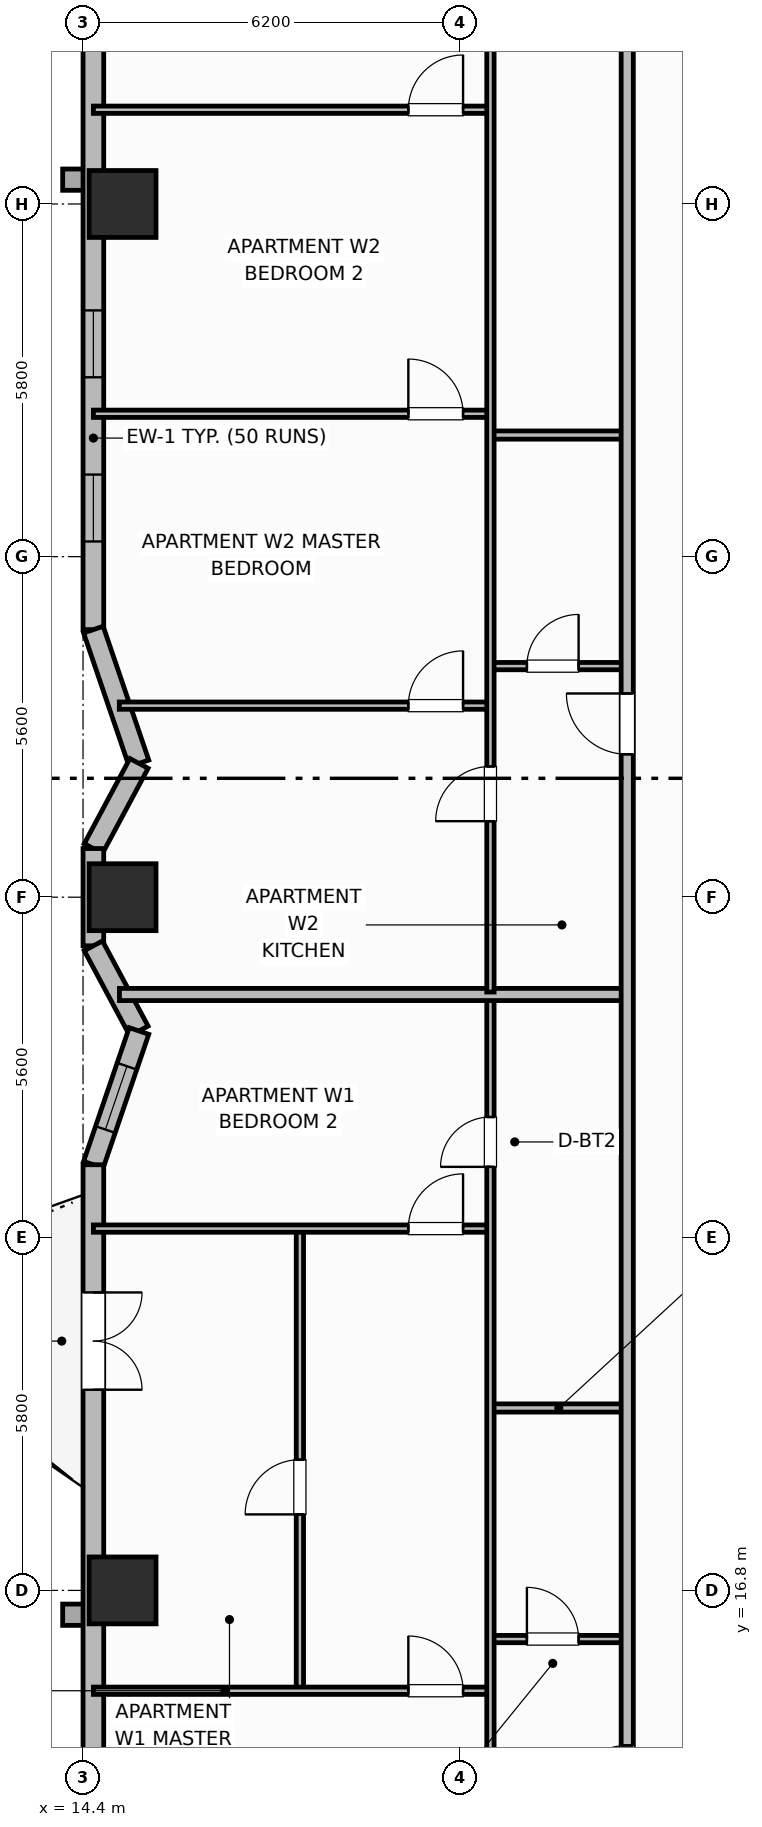
"""IFC4 building model, lengths in metres.
Left out: names, types, materials, properties, quantities, classifications, styles, units other than length and angle.
Written with IfcOpenShell. Run it as: python <this file> out.ifc"""

import sys

from ifc_helpers import new_model, si_unit, direction, frame, frame_2d, origin, origin_2d, place, context, subcontext, project, spatial, rectangle, extrude, element, fill, save


model = new_model("IFC4")
c1 = context("Model", 3, precision=1e-05, world=origin(), true_north=direction((0.0, 1.0)))
c2 = subcontext(c1, "Body", "Model", "MODEL_VIEW")
j1 = project(units=[si_unit("LENGTHUNIT", "METRE"), si_unit("PLANEANGLEUNIT", "RADIAN")], contexts=[c1])
p1 = place(None, origin())
s1 = spatial("IfcSite", under=j1, at=p1, CompositionType="ELEMENT")
p2 = place(p1, origin())
s2 = spatial("IfcBuilding", under=s1, at=p2, CompositionType="ELEMENT")
p3 = place(p2, frame((0.0, 0.0, 117.9)))
s3 = spatial("IfcBuildingStorey", under=s2, at=p3, CompositionType="ELEMENT", Elevation=117.9)
for number, where, z_axis, x_axis in (
    (1, (15.05, 16.8, 0.0), (0.0, 0.0, 1.0), (1.0, 0.0, 0.0)),
    (2, (15.05, 28.2, 0.0), (0.0, 0.0, 1.0), (1.0, 0.0, 0.0)),
    (3, (15.05, 39.6, 0.0), (0.0, 0.0, 1.0), (1.0, 0.0, 0.0)),
):
    element("IfcColumn", number, at=place(p3, frame(where, z_axis=z_axis, x_axis=x_axis)), inside=s3, PredefinedType="COLUMN", context=c2, shape_type="SweptSolid", body=[
        extrude(rectangle(XDim=1.1, YDim=1.1, at=origin_2d()), origin(), (0.0, 0.0, 1.0), 3.7),
    ])
p4 = place(p3, frame((14.57, 47.4, 0.0), z_axis=(0.0, 0.0, 1.0), x_axis=(0.0, -1.0, 0.0)))
e4 = element("IfcWall", 4, at=p4, inside=s3, PredefinedType="SOLIDWALL", context=c2, shape_type="SweptSolid", body=[
    extrude(rectangle(XDim=14.8, YDim=0.34, at=frame_2d((7.4, 0.0))), origin(), (0.0, 0.0, 1.0), 2.7),
])
p5 = place(p4, frame((4.15, 0.0, 0.93)))
e5 = element("IfcOpeningElement", 5, at=p5, cuts=e4, PredefinedType="OPENING", context=c2, shape_type="SweptSolid", body=[
    extrude(rectangle(XDim=1.1, YDim=1.65, at=frame_2d((0.55, 0.825))), frame((0.0, 0.18, 0.0), z_axis=(0.0, -1.0, 0.0), x_axis=(1.0, 0.0, 0.0)), (0.0, 0.0, 1.0), 0.36),
])
p6 = place(p4, frame((9.55, 0.0, 0.93)))
e6 = element("IfcOpeningElement", 6, at=p6, cuts=e4, PredefinedType="OPENING", context=c2, shape_type="SweptSolid", body=[
    extrude(rectangle(XDim=1.1, YDim=1.65, at=frame_2d((0.55, 0.825))), frame((0.0, 0.18, 0.0), z_axis=(0.0, -1.0, 0.0), x_axis=(1.0, 0.0, 0.0)), (0.0, 0.0, 1.0), 0.36),
])
p7 = place(p4, frame((12.25, 0.0, 0.93)))
e7 = element("IfcOpeningElement", 7, at=p7, cuts=e4, PredefinedType="OPENING", context=c2, shape_type="SweptSolid", body=[
    extrude(rectangle(XDim=1.1, YDim=1.65, at=frame_2d((0.55, 0.825))), frame((0.0, 0.18, 0.0), z_axis=(0.0, -1.0, 0.0), x_axis=(1.0, 0.0, 0.0)), (0.0, 0.0, 1.0), 0.36),
])
p8 = place(p3, frame((14.57, 32.6, 0.0), z_axis=(0.0, 0.0, 1.0), x_axis=(0.32264826586, -0.946518936175, 0.0)))
e8 = element("IfcWall", 8, at=p8, inside=s3, PredefinedType="SOLIDWALL", context=c2, shape_type="SweptSolid", body=[
    extrude(rectangle(XDim=2.324, YDim=0.34, at=frame_2d((1.162, 0.0))), origin(), (0.0, 0.0, 1.0), 2.7),
])
p9 = place(p3, frame((15.32, 30.4, 0.0), z_axis=(0.0, 0.0, 1.0), x_axis=(-0.472247007964, -0.881466257703, 0.0)))
e9 = element("IfcWall", 9, at=p9, inside=s3, PredefinedType="SOLIDWALL", context=c2, shape_type="SweptSolid", body=[
    extrude(rectangle(XDim=1.588, YDim=0.34, at=frame_2d((0.794, 0.0))), origin(), (0.0, 0.0, 1.0), 2.7),
])
p10 = place(p3, frame((14.57, 29.0, 0.0), z_axis=(0.0, 0.0, 1.0), x_axis=(0.0, -1.0, 0.0)))
e10 = element("IfcWall", 10, at=p10, inside=s3, PredefinedType="SOLIDWALL", context=c2, shape_type="SweptSolid", body=[
    extrude(rectangle(XDim=1.6, YDim=0.34, at=frame_2d((0.8, 0.0))), origin(), (0.0, 0.0, 1.0), 2.7),
])
p11 = place(p3, frame((14.57, 27.4, 0.0), z_axis=(0.0, 0.0, 1.0), x_axis=(0.472247007964, -0.881466257703, 0.0)))
e11 = element("IfcWall", 11, at=p11, inside=s3, PredefinedType="SOLIDWALL", context=c2, shape_type="SweptSolid", body=[
    extrude(rectangle(XDim=1.588, YDim=0.34, at=frame_2d((0.794, 0.0))), origin(), (0.0, 0.0, 1.0), 2.7),
])
p12 = place(p3, frame((15.32, 26.0, 0.0), z_axis=(0.0, 0.0, 1.0), x_axis=(-0.322680343871, -0.946508000853, 0.0)))
e12 = element("IfcWall", 12, at=p12, inside=s3, PredefinedType="SOLIDWALL", context=c2, shape_type="SweptSolid", body=[
    extrude(rectangle(XDim=2.324, YDim=0.34, at=frame_2d((1.162, 0.0))), origin(), (0.0, 0.0, 1.0), 2.7),
])
p13 = place(p12, frame((0.612, 0.0, 0.89)))
e13 = element("IfcOpeningElement", 13, at=p13, cuts=e12, PredefinedType="OPENING", context=c2, shape_type="SweptSolid", body=[
    extrude(rectangle(XDim=1.1, YDim=1.65, at=frame_2d((0.55, 0.825))), frame((0.0, 0.18, 0.0), z_axis=(0.0, -1.0, 0.0), x_axis=(1.0, 0.0, 0.0)), (0.0, 0.0, 1.0), 0.36),
])
p14 = place(p3, frame((14.57, 23.8, 0.0), z_axis=(0.0, 0.0, 1.0), x_axis=(0.0, -1.0, 0.0)))
e14 = element("IfcWall", 14, at=p14, inside=s3, PredefinedType="SOLIDWALL", context=c2, shape_type="SweptSolid", body=[
    extrude(rectangle(XDim=14.8, YDim=0.34, at=frame_2d((7.4, 0.0))), origin(), (0.0, 0.0, 1.0), 2.7),
])
p15 = place(p14, frame((2.1, 0.0, 0.0)))
e15 = element("IfcOpeningElement", 15, at=p15, cuts=e14, PredefinedType="OPENING", context=c2, shape_type="SweptSolid", body=[
    extrude(rectangle(XDim=1.6, YDim=2.1, at=frame_2d((0.8, 1.05))), frame((0.0, 0.18, 0.0), z_axis=(0.0, -1.0, 0.0), x_axis=(1.0, 0.0, 0.0)), (0.0, 0.0, 1.0), 0.36),
])
p16 = place(p14, frame((9.8, 0.0, 0.68)))
e16 = element("IfcOpeningElement", 16, at=p16, cuts=e14, PredefinedType="OPENING", context=c2, shape_type="SweptSolid", body=[
    extrude(rectangle(XDim=2.1, YDim=1.9, at=frame_2d((1.05, 0.95))), frame((0.0, 0.18, 0.0), z_axis=(0.0, -1.0, 0.0), x_axis=(1.0, 0.0, 0.0)), (0.0, 0.0, 1.0), 0.36),
])
p17 = place(p3, frame((21.1, 16.0, 0.0), z_axis=(0.0, 0.0, 1.0), x_axis=(1.0, 0.0, 0.0)))
e17 = element("IfcWall", 17, at=p17, inside=s3, PredefinedType="PARTITIONING", context=c2, shape_type="SweptSolid", body=[
    extrude(rectangle(XDim=2.25, YDim=0.12, at=frame_2d((1.125, 0.0))), origin(), (0.0, 0.0, 1.0), 2.53),
])
p18 = place(p17, frame((0.6, 0.0, 0.0)))
e18 = element("IfcOpeningElement", 18, at=p18, cuts=e17, PredefinedType="OPENING", context=c2, shape_type="SweptSolid", body=[
    extrude(rectangle(XDim=0.85, YDim=2.1, at=frame_2d((0.425, 1.05))), frame((0.0, 0.07, 0.0), z_axis=(0.0, -1.0, 0.0), x_axis=(1.0, 0.0, 0.0)), (0.0, 0.0, 1.0), 0.14),
])
p19 = place(p3, frame((21.1, 19.8, 0.0), z_axis=(0.0, 0.0, 1.0), x_axis=(1.0, 0.0, 0.0)))
e19 = element("IfcWall", 19, at=p19, inside=s3, PredefinedType="PARTITIONING", context=c2, shape_type="SweptSolid", body=[
    extrude(rectangle(XDim=2.25, YDim=0.135, at=frame_2d((1.125, 0.0))), origin(), (0.0, 0.0, 1.0), 2.53),
])
p20 = place(p3, frame((17.966, 15.19, 0.0), z_axis=(0.0, 0.0, 1.0), x_axis=(0.0, 1.0, 0.0)))
e20 = element("IfcWall", 20, at=p20, inside=s3, PredefinedType="PARTITIONING", context=c2, shape_type="SweptSolid", body=[
    extrude(rectangle(XDim=7.52, YDim=0.12, at=frame_2d((3.76, 0.0))), origin(), (0.0, 0.0, 1.0), 2.53),
])
p21 = place(p20, frame((2.86, 0.0, 0.0)))
e21 = element("IfcOpeningElement", 21, at=p21, cuts=e20, PredefinedType="OPENING", context=c2, shape_type="SweptSolid", body=[
    extrude(rectangle(XDim=0.9, YDim=2.1, at=frame_2d((0.45, 1.05))), frame((0.0, 0.07, 0.0), z_axis=(0.0, -1.0, 0.0), x_axis=(1.0, 0.0, 0.0)), (0.0, 0.0, 1.0), 0.14),
])
p22 = place(p3, frame((14.57, 15.15, 0.0), z_axis=(0.0, 0.0, 1.0), x_axis=(1.0, 0.0, 0.0)))
e22 = element("IfcWall", 22, at=p22, inside=s3, PredefinedType="PARTITIONING", context=c2, shape_type="SweptSolid", body=[
    extrude(rectangle(XDim=6.53, YDim=0.12, at=frame_2d((3.265, 0.0))), origin(), (0.0, 0.0, 1.0), 2.53),
])
p23 = place(p22, frame((5.18, 0.0, 0.0)))
e23 = element("IfcOpeningElement", 23, at=p23, cuts=e22, PredefinedType="OPENING", context=c2, shape_type="SweptSolid", body=[
    extrude(rectangle(XDim=0.9, YDim=2.1, at=frame_2d((0.45, 1.05))), frame((0.0, 0.07, 0.0), z_axis=(0.0, -1.0, 0.0), x_axis=(1.0, 0.0, 0.0)), (0.0, 0.0, 1.0), 0.14),
])
p24 = place(p3, frame((14.57, 22.75, 0.0), z_axis=(0.0, 0.0, 1.0), x_axis=(1.0, 0.0, 0.0)))
e24 = element("IfcWall", 24, at=p24, inside=s3, PredefinedType="PARTITIONING", context=c2, shape_type="SweptSolid", body=[
    extrude(rectangle(XDim=6.53, YDim=0.12, at=frame_2d((3.265, 0.0))), origin(), (0.0, 0.0, 1.0), 2.53),
])
p25 = place(p24, frame((5.18, 0.0, 0.0)))
e25 = element("IfcOpeningElement", 25, at=p25, cuts=e24, PredefinedType="OPENING", context=c2, shape_type="SweptSolid", body=[
    extrude(rectangle(XDim=0.9, YDim=2.1, at=frame_2d((0.45, 1.05))), frame((0.0, 0.07, 0.0), z_axis=(0.0, -1.0, 0.0), x_axis=(1.0, 0.0, 0.0)), (0.0, 0.0, 1.0), 0.14),
])
p26 = place(p3, frame((21.1, 10.64, 0.0), z_axis=(0.0, 0.0, 1.0), x_axis=(0.0, 1.0, 0.0)))
e26 = element("IfcWall", 26, at=p26, inside=s3, PredefinedType="PARTITIONING", context=c2, shape_type="SweptSolid", body=[
    extrude(rectangle(XDim=15.92, YDim=0.12, at=frame_2d((7.96, 0.0))), origin(), (0.0, 0.0, 1.0), 2.53),
])
p27 = place(p26, frame((0.41, 0.0, 0.0)))
e27 = element("IfcOpeningElement", 27, at=p27, cuts=e26, PredefinedType="OPENING", context=c2, shape_type="SweptSolid", body=[
    extrude(rectangle(XDim=0.9, YDim=2.1, at=frame_2d((0.45, 1.05))), frame((0.0, 0.07, 0.0), z_axis=(0.0, -1.0, 0.0), x_axis=(1.0, 0.0, 0.0)), (0.0, 0.0, 1.0), 0.14),
])
p28 = place(p26, frame((13.125, 0.0, 0.0)))
e28 = element("IfcOpeningElement", 28, at=p28, cuts=e26, PredefinedType="OPENING", context=c2, shape_type="SweptSolid", body=[
    extrude(rectangle(XDim=0.82, YDim=2.08, at=frame_2d((0.41, 1.04))), frame((0.0, 0.07, 0.0), z_axis=(0.0, -1.0, 0.0), x_axis=(1.0, 0.0, 0.0)), (0.0, 0.0, 1.0), 0.14),
])
p29 = place(p3, frame((14.999, 26.6, 0.0), z_axis=(0.0, 0.0, 1.0), x_axis=(1.0, 0.0, 0.0)))
e29 = element("IfcWall", 29, at=p29, inside=s3, PredefinedType="PARTITIONING", context=c2, shape_type="SweptSolid", body=[
    extrude(rectangle(XDim=8.352, YDim=0.2, at=frame_2d((4.176, 0.0))), origin(), (0.0, 0.0, 1.0), 2.53),
])
p30 = place(p3, frame((21.1, 32.0, 0.0), z_axis=(0.0, 0.0, 1.0), x_axis=(1.0, 0.0, 0.0)))
e30 = element("IfcWall", 30, at=p30, inside=s3, PredefinedType="PARTITIONING", context=c2, shape_type="SweptSolid", body=[
    extrude(rectangle(XDim=2.25, YDim=0.12, at=frame_2d((1.125, 0.0))), origin(), (0.0, 0.0, 1.0), 2.53),
])
p31 = place(p30, frame((0.6, 0.0, 0.0)))
e31 = element("IfcOpeningElement", 31, at=p31, cuts=e30, PredefinedType="OPENING", context=c2, shape_type="SweptSolid", body=[
    extrude(rectangle(XDim=0.85, YDim=2.1, at=frame_2d((0.425, 1.05))), frame((0.0, 0.07, 0.0), z_axis=(0.0, -1.0, 0.0), x_axis=(1.0, 0.0, 0.0)), (0.0, 0.0, 1.0), 0.14),
])
p32 = place(p3, frame((21.1, 35.8, 0.0), z_axis=(0.0, 0.0, 1.0), x_axis=(1.0, 0.0, 0.0)))
e32 = element("IfcWall", 32, at=p32, inside=s3, PredefinedType="PARTITIONING", context=c2, shape_type="SweptSolid", body=[
    extrude(rectangle(XDim=2.25, YDim=0.135, at=frame_2d((1.125, 0.0))), origin(), (0.0, 0.0, 1.0), 2.53),
])
p33 = place(p3, frame((14.996, 31.35, 0.0), z_axis=(0.0, 0.0, 1.0), x_axis=(1.0, 0.0, 0.0)))
e33 = element("IfcWall", 33, at=p33, inside=s3, PredefinedType="PARTITIONING", context=c2, shape_type="SweptSolid", body=[
    extrude(rectangle(XDim=6.104, YDim=0.12, at=frame_2d((3.052, 0.0))), origin(), (0.0, 0.0, 1.0), 2.53),
])
p34 = place(p33, frame((4.754, 0.0, 0.0)))
e34 = element("IfcOpeningElement", 34, at=p34, cuts=e33, PredefinedType="OPENING", context=c2, shape_type="SweptSolid", body=[
    extrude(rectangle(XDim=0.9, YDim=2.1, at=frame_2d((0.45, 1.05))), frame((0.0, 0.07, 0.0), z_axis=(0.0, -1.0, 0.0), x_axis=(1.0, 0.0, 0.0)), (0.0, 0.0, 1.0), 0.14),
])
p35 = place(p3, frame((14.57, 36.15, 0.0), z_axis=(0.0, 0.0, 1.0), x_axis=(1.0, 0.0, 0.0)))
e35 = element("IfcWall", 35, at=p35, inside=s3, PredefinedType="PARTITIONING", context=c2, shape_type="SweptSolid", body=[
    extrude(rectangle(XDim=6.53, YDim=0.12, at=frame_2d((3.265, 0.0))), origin(), (0.0, 0.0, 1.0), 2.53),
])
p36 = place(p35, frame((5.18, 0.0, 0.0)))
e36 = element("IfcOpeningElement", 36, at=p36, cuts=e35, PredefinedType="OPENING", context=c2, shape_type="SweptSolid", body=[
    extrude(rectangle(XDim=0.9, YDim=2.1, at=frame_2d((0.45, 1.05))), frame((0.0, 0.07, 0.0), z_axis=(0.0, -1.0, 0.0), x_axis=(1.0, 0.0, 0.0)), (0.0, 0.0, 1.0), 0.14),
])
p37 = place(p3, frame((14.57, 41.15, 0.0), z_axis=(0.0, 0.0, 1.0), x_axis=(1.0, 0.0, 0.0)))
e37 = element("IfcWall", 37, at=p37, inside=s3, PredefinedType="PARTITIONING", context=c2, shape_type="SweptSolid", body=[
    extrude(rectangle(XDim=6.53, YDim=0.12, at=frame_2d((3.265, 0.0))), origin(), (0.0, 0.0, 1.0), 2.53),
])
p38 = place(p37, frame((5.18, 0.0, 0.0)))
e38 = element("IfcOpeningElement", 38, at=p38, cuts=e37, PredefinedType="OPENING", context=c2, shape_type="SweptSolid", body=[
    extrude(rectangle(XDim=0.9, YDim=2.1, at=frame_2d((0.45, 1.05))), frame((0.0, 0.07, 0.0), z_axis=(0.0, -1.0, 0.0), x_axis=(1.0, 0.0, 0.0)), (0.0, 0.0, 1.0), 0.14),
])
p39 = place(p3, frame((21.1, 26.64, 0.0), z_axis=(0.0, 0.0, 1.0), x_axis=(0.0, 1.0, 0.0)))
e39 = element("IfcWall", 39, at=p39, inside=s3, PredefinedType="PARTITIONING", context=c2, shape_type="SweptSolid", body=[
    extrude(rectangle(XDim=19.12, YDim=0.12, at=frame_2d((9.56, 0.0))), origin(), (0.0, 0.0, 1.0), 2.53),
])
p40 = place(p39, frame((2.81, 0.0, 0.0)))
e40 = element("IfcOpeningElement", 40, at=p40, cuts=e39, PredefinedType="OPENING", context=c2, shape_type="SweptSolid", body=[
    extrude(rectangle(XDim=0.9, YDim=2.1, at=frame_2d((0.45, 1.05))), frame((0.0, 0.07, 0.0), z_axis=(0.0, -1.0, 0.0), x_axis=(1.0, 0.0, 0.0)), (0.0, 0.0, 1.0), 0.14),
])
p41 = place(p39, frame((16.18, 0.0, 0.0)))
e41 = element("IfcOpeningElement", 41, at=p41, cuts=e39, PredefinedType="OPENING", context=c2, shape_type="SweptSolid", body=[
    extrude(rectangle(XDim=0.82, YDim=2.08, at=frame_2d((0.41, 1.04))), frame((0.0, 0.07, 0.0), z_axis=(0.0, -1.0, 0.0), x_axis=(1.0, 0.0, 0.0)), (0.0, 0.0, 1.0), 0.14),
])
p42 = place(p3, frame((23.35, 10.6, 0.0), z_axis=(0.0, 0.0, 1.0), x_axis=(0.0, 1.0, 0.0)))
e42 = element("IfcWall", 42, at=p42, inside=s3, PredefinedType="PARTITIONING", context=c2, shape_type="SweptSolid", body=[
    extrude(rectangle(XDim=35.2, YDim=0.2, at=frame_2d((17.6, 0.0))), origin(), (0.0, 0.0, 1.0), 2.53),
])
p43 = place(p42, frame((2.65, 0.0, 0.0)))
e43 = element("IfcOpeningElement", 43, at=p43, cuts=e42, PredefinedType="OPENING", context=c2, shape_type="SweptSolid", body=[
    extrude(rectangle(XDim=1.0, YDim=2.15, at=frame_2d((0.5, 1.075))), frame((0.0, 0.11, 0.0), z_axis=(0.0, -1.0, 0.0), x_axis=(1.0, 0.0, 0.0)), (0.0, 0.0, 1.0), 0.22),
])
p44 = place(p42, frame((19.95, 0.0, 0.0)))
e44 = element("IfcOpeningElement", 44, at=p44, cuts=e42, PredefinedType="OPENING", context=c2, shape_type="SweptSolid", body=[
    extrude(rectangle(XDim=1.0, YDim=2.15, at=frame_2d((0.5, 1.075))), frame((0.0, 0.11, 0.0), z_axis=(0.0, -1.0, 0.0), x_axis=(1.0, 0.0, 0.0)), (0.0, 0.0, 1.0), 0.22),
])
p45 = place(p6, origin())
e45 = element("IfcWindow", 45, at=p45, inside=s3, PartitioningType="SINGLE_PANEL", PredefinedType="WINDOW", context=c2, shape_type="SweptSolid", body=[
    extrude(rectangle(XDim=1.1, YDim=1.65, at=frame_2d((0.55, 0.825))), frame((0.0, 0.03, 0.0), z_axis=(0.0, -1.0, 0.0), x_axis=(1.0, 0.0, 0.0)), (0.0, 0.0, 1.0), 0.06),
])
fill(e6, e45)
p46 = place(p7, origin())
e46 = element("IfcWindow", 46, at=p46, inside=s3, PartitioningType="SINGLE_PANEL", PredefinedType="WINDOW", context=c2, shape_type="SweptSolid", body=[
    extrude(rectangle(XDim=1.1, YDim=1.65, at=frame_2d((0.55, 0.825))), frame((0.0, 0.03, 0.0), z_axis=(0.0, -1.0, 0.0), x_axis=(1.0, 0.0, 0.0)), (0.0, 0.0, 1.0), 0.06),
])
fill(e7, e46)
p47 = place(p13, origin())
e47 = element("IfcWindow", 47, at=p47, inside=s3, PartitioningType="SINGLE_PANEL", PredefinedType="WINDOW", context=c2, shape_type="SweptSolid", body=[
    extrude(rectangle(XDim=1.1, YDim=1.65, at=frame_2d((0.55, 0.825))), frame((0.0, 0.03, 0.0), z_axis=(0.0, -1.0, 0.0), x_axis=(1.0, 0.0, 0.0)), (0.0, 0.0, 1.0), 0.06),
])
fill(e13, e47)
p48 = place(p15, origin())
e48 = element("IfcDoor", 48, at=p48, inside=s3, OperationType="DOUBLE_DOOR_SINGLE_SWING", PredefinedType="DOOR", context=c2, shape_type="SweptSolid", body=[
    extrude(rectangle(XDim=1.6, YDim=2.1, at=frame_2d((0.8, 1.05))), frame((0.0, 0.025, 0.0), z_axis=(0.0, -1.0, 0.0), x_axis=(1.0, 0.0, 0.0)), (0.0, 0.0, 1.0), 0.05),
])
fill(e15, e48)
p49 = place(p18, origin())
e49 = element("IfcDoor", 49, at=p49, inside=s3, OperationType="SINGLE_SWING_LEFT", PredefinedType="DOOR", context=c2, shape_type="SweptSolid", body=[
    extrude(rectangle(XDim=0.85, YDim=2.1, at=frame_2d((0.425, 1.05))), frame((0.0, 0.025, 0.0), z_axis=(0.0, -1.0, 0.0), x_axis=(1.0, 0.0, 0.0)), (0.0, 0.0, 1.0), 0.05),
])
fill(e18, e49)
p50 = place(p21, origin())
e50 = element("IfcDoor", 50, at=p50, inside=s3, OperationType="SINGLE_SWING_LEFT", PredefinedType="DOOR", context=c2, shape_type="SweptSolid", body=[
    extrude(rectangle(XDim=0.9, YDim=2.1, at=frame_2d((0.45, 1.05))), frame((0.0, 0.025, 0.0), z_axis=(0.0, -1.0, 0.0), x_axis=(1.0, 0.0, 0.0)), (0.0, 0.0, 1.0), 0.05),
])
fill(e21, e50)
p51 = place(p23, origin())
e51 = element("IfcDoor", 51, at=p51, inside=s3, OperationType="SINGLE_SWING_LEFT", PredefinedType="DOOR", context=c2, shape_type="SweptSolid", body=[
    extrude(rectangle(XDim=0.9, YDim=2.1, at=frame_2d((0.45, 1.05))), frame((0.0, 0.025, 0.0), z_axis=(0.0, -1.0, 0.0), x_axis=(1.0, 0.0, 0.0)), (0.0, 0.0, 1.0), 0.05),
])
fill(e23, e51)
p52 = place(p25, origin())
e52 = element("IfcDoor", 52, at=p52, inside=s3, OperationType="SINGLE_SWING_RIGHT", PredefinedType="DOOR", context=c2, shape_type="SweptSolid", body=[
    extrude(rectangle(XDim=0.9, YDim=2.1, at=frame_2d((0.45, 1.05))), frame((0.0, 0.025, 0.0), z_axis=(0.0, -1.0, 0.0), x_axis=(1.0, 0.0, 0.0)), (0.0, 0.0, 1.0), 0.05),
])
fill(e25, e52)
p53 = place(p28, origin())
e53 = element("IfcDoor", 53, at=p53, inside=s3, OperationType="SINGLE_SWING_LEFT", PredefinedType="DOOR", context=c2, shape_type="SweptSolid", body=[
    extrude(rectangle(XDim=0.82, YDim=2.08, at=frame_2d((0.41, 1.04))), frame((0.0, 0.025, 0.0), z_axis=(0.0, -1.0, 0.0), x_axis=(1.0, 0.0, 0.0)), (0.0, 0.0, 1.0), 0.05),
])
fill(e28, e53)
p54 = place(p31, origin())
e54 = element("IfcDoor", 54, at=p54, inside=s3, OperationType="SINGLE_SWING_RIGHT", PredefinedType="DOOR", context=c2, shape_type="SweptSolid", body=[
    extrude(rectangle(XDim=0.85, YDim=2.1, at=frame_2d((0.425, 1.05))), frame((0.0, 0.025, 0.0), z_axis=(0.0, -1.0, 0.0), x_axis=(1.0, 0.0, 0.0)), (0.0, 0.0, 1.0), 0.05),
])
fill(e31, e54)
p55 = place(p34, origin())
e55 = element("IfcDoor", 55, at=p55, inside=s3, OperationType="SINGLE_SWING_RIGHT", PredefinedType="DOOR", context=c2, shape_type="SweptSolid", body=[
    extrude(rectangle(XDim=0.9, YDim=2.1, at=frame_2d((0.45, 1.05))), frame((0.0, 0.025, 0.0), z_axis=(0.0, -1.0, 0.0), x_axis=(1.0, 0.0, 0.0)), (0.0, 0.0, 1.0), 0.05),
])
fill(e34, e55)
p56 = place(p36, origin())
e56 = element("IfcDoor", 56, at=p56, inside=s3, OperationType="SINGLE_SWING_LEFT", PredefinedType="DOOR", context=c2, shape_type="SweptSolid", body=[
    extrude(rectangle(XDim=0.9, YDim=2.1, at=frame_2d((0.45, 1.05))), frame((0.0, 0.025, 0.0), z_axis=(0.0, -1.0, 0.0), x_axis=(1.0, 0.0, 0.0)), (0.0, 0.0, 1.0), 0.05),
])
fill(e36, e56)
p57 = place(p38, origin())
e57 = element("IfcDoor", 57, at=p57, inside=s3, OperationType="SINGLE_SWING_RIGHT", PredefinedType="DOOR", context=c2, shape_type="SweptSolid", body=[
    extrude(rectangle(XDim=0.9, YDim=2.1, at=frame_2d((0.45, 1.05))), frame((0.0, 0.025, 0.0), z_axis=(0.0, -1.0, 0.0), x_axis=(1.0, 0.0, 0.0)), (0.0, 0.0, 1.0), 0.05),
])
fill(e38, e57)
p58 = place(p40, origin())
e58 = element("IfcDoor", 58, at=p58, inside=s3, OperationType="SINGLE_SWING_LEFT", PredefinedType="DOOR", context=c2, shape_type="SweptSolid", body=[
    extrude(rectangle(XDim=0.9, YDim=2.1, at=frame_2d((0.45, 1.05))), frame((0.0, 0.025, 0.0), z_axis=(0.0, -1.0, 0.0), x_axis=(1.0, 0.0, 0.0)), (0.0, 0.0, 1.0), 0.05),
])
fill(e40, e58)
p59 = place(p43, origin())
e59 = element("IfcDoor", 59, at=p59, inside=s3, OperationType="SINGLE_SWING_LEFT", PredefinedType="DOOR", context=c2, shape_type="SweptSolid", body=[
    extrude(rectangle(XDim=1.0, YDim=2.15, at=frame_2d((0.5, 1.075))), frame((0.0, 0.025, 0.0), z_axis=(0.0, -1.0, 0.0), x_axis=(1.0, 0.0, 0.0)), (0.0, 0.0, 1.0), 0.05),
])
fill(e43, e59)
p60 = place(p44, origin())
e60 = element("IfcDoor", 60, at=p60, inside=s3, OperationType="SINGLE_SWING_RIGHT", PredefinedType="DOOR", context=c2, shape_type="SweptSolid", body=[
    extrude(rectangle(XDim=1.0, YDim=2.15, at=frame_2d((0.5, 1.075))), frame((0.0, 0.025, 0.0), z_axis=(0.0, -1.0, 0.0), x_axis=(1.0, 0.0, 0.0)), (0.0, 0.0, 1.0), 0.05),
])
fill(e44, e60)
save(model, sys.argv[1])
